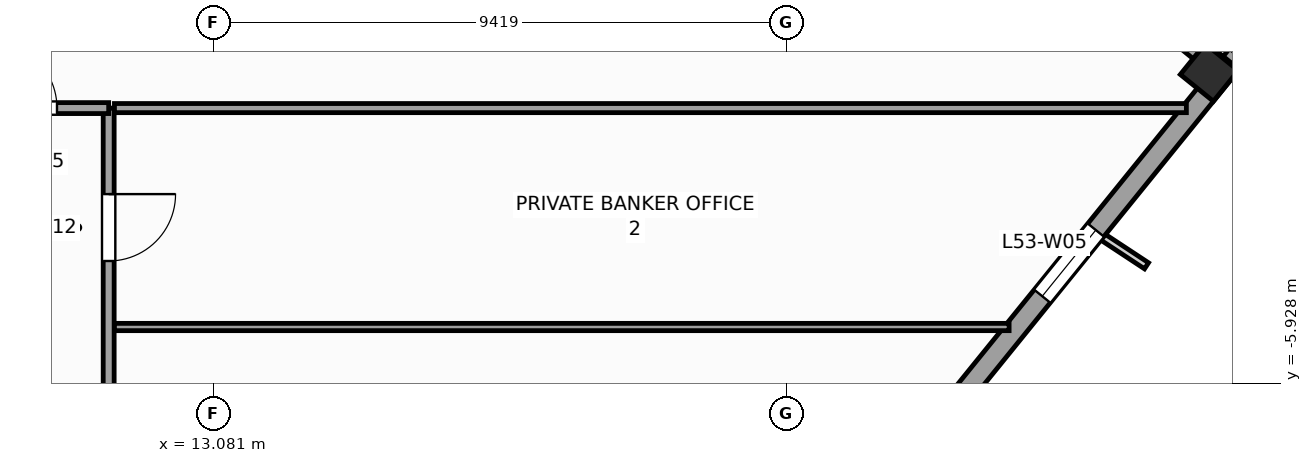
"""IFC4 building model, lengths in metres.
Left out: names, types, materials, properties, quantities, classifications, styles, units other than length and angle.
Written with IfcOpenShell. Run it as: python <this file> out.ifc"""

import sys

from ifc_helpers import new_model, si_unit, direction, frame, frame_2d, origin, origin_2d, place, context, subcontext, project, spatial, rectangle, extrude, source, transform, mapped, element, fill, save


model = new_model("IFC4")
c1 = context("Model", 3, precision=1e-05, world=origin(), true_north=direction((0.0, 1.0)))
c2 = subcontext(c1, "Body", "Model", "MODEL_VIEW")
j1 = project(units=[si_unit("LENGTHUNIT", "METRE"), si_unit("PLANEANGLEUNIT", "RADIAN")], contexts=[c1])
p1 = place(None, origin())
s1 = spatial("IfcSite", under=j1, at=p1, CompositionType="ELEMENT")
p2 = place(p1, origin())
s2 = spatial("IfcBuilding", under=s1, at=p2, CompositionType="ELEMENT")
p3 = place(p2, frame((0.0, 0.0, 221.2)))
s3 = spatial("IfcBuildingStorey", under=s2, at=p3, CompositionType="ELEMENT", Elevation=221.2)
m1 = source(origin(), c2, "Body", "SweptSolid", [
    extrude(rectangle(XDim=0.65, YDim=0.7, at=origin_2d()), origin(), (0.0, 0.0, 1.0), 3.9),
])
p4 = place(p3, frame((29.45, -0.815, 0.0), z_axis=(0.0, 0.0, 1.0), x_axis=(0.62932039105, 0.777145961457, 0.0)))
e1 = element("IfcColumn", 1, at=p4, inside=s3, PredefinedType="COLUMN", context=c2, shape_type="MappedRepresentation", body=[
    mapped(m1, transform((0.0, 0.0, 0.0), scale=1.0)),
])
p5 = place(p3, frame((6.733, -29.154, 0.0), z_axis=(0.0, 0.0, 1.0), x_axis=(0.629325378072, 0.77714192302, 0.0)))
e2 = element("IfcWall", 2, at=p5, inside=s3, PredefinedType="STANDARD", context=c2, shape_type="SweptSolid", body=[
    extrude(rectangle(XDim=36.84, YDim=0.34, at=frame_2d((18.42, 0.0))), origin(), (0.0, 0.0, 1.0), 2.96),
])
p6 = place(p5, frame((23.495, 0.0, 0.0)))
e3 = element("IfcOpeningElement", 3, at=p6, cuts=e2, PredefinedType="OPENING", context=c2, shape_type="SweptSolid", body=[
    extrude(rectangle(XDim=1.05, YDim=2.25, at=frame_2d((0.525, 1.125))), frame((0.0, 0.18, 0.0), z_axis=(0.0, -1.0, 0.0), x_axis=(1.0, 0.0, 0.0)), (0.0, 0.0, 1.0), 0.36),
])
p7 = place(p5, frame((3.721, 0.0, 0.48)))
e4 = element("IfcOpeningElement", 4, at=p7, cuts=e2, PredefinedType="OPENING", context=c2, shape_type="SweptSolid", body=[
    extrude(rectangle(XDim=1.4, YDim=2.4, at=frame_2d((0.7, 1.2))), frame((0.0, 0.18, 0.0), z_axis=(0.0, -1.0, 0.0), x_axis=(1.0, 0.0, 0.0)), (0.0, 0.0, 1.0), 0.36),
])
p8 = place(p5, frame((10.559, 0.0, 0.58)))
e5 = element("IfcOpeningElement", 5, at=p8, cuts=e2, PredefinedType="OPENING", context=c2, shape_type="SweptSolid", body=[
    extrude(rectangle(XDim=1.75, YDim=2.3, at=frame_2d((0.875, 1.15))), frame((0.0, 0.18, 0.0), z_axis=(0.0, -1.0, 0.0), x_axis=(1.0, 0.0, 0.0)), (0.0, 0.0, 1.0), 0.36),
])
p9 = place(p5, frame((16.058, 0.0, 0.58)))
e6 = element("IfcOpeningElement", 6, at=p9, cuts=e2, PredefinedType="OPENING", context=c2, shape_type="SweptSolid", body=[
    extrude(rectangle(XDim=1.75, YDim=2.3, at=frame_2d((0.875, 1.15))), frame((0.0, 0.18, 0.0), z_axis=(0.0, -1.0, 0.0), x_axis=(1.0, 0.0, 0.0)), (0.0, 0.0, 1.0), 0.36),
])
p10 = place(p5, frame((25.676, 0.0, 0.58)))
e7 = element("IfcOpeningElement", 7, at=p10, cuts=e2, PredefinedType="OPENING", context=c2, shape_type="SweptSolid", body=[
    extrude(rectangle(XDim=1.75, YDim=2.3, at=frame_2d((0.875, 1.15))), frame((0.0, 0.18, 0.0), z_axis=(0.0, -1.0, 0.0), x_axis=(1.0, 0.0, 0.0)), (0.0, 0.0, 1.0), 0.36),
])
p11 = place(p5, frame((31.732, 0.0, 0.48)))
e8 = element("IfcOpeningElement", 8, at=p11, cuts=e2, PredefinedType="OPENING", context=c2, shape_type="SweptSolid", body=[
    extrude(rectangle(XDim=1.4, YDim=2.4, at=frame_2d((0.7, 1.2))), frame((0.0, 0.18, 0.0), z_axis=(0.0, -1.0, 0.0), x_axis=(1.0, 0.0, 0.0)), (0.0, 0.0, 1.0), 0.36),
])
p12 = place(p3, frame((29.703, -0.789, 0.0), z_axis=(0.0, 0.0, 1.0), x_axis=(-0.77714355312, 0.629323365087, 0.0)))
e9 = element("IfcWall", 9, at=p12, inside=s3, PredefinedType="STANDARD", context=c2, shape_type="SweptSolid", body=[
    extrude(rectangle(XDim=5.5, YDim=0.34, at=frame_2d((2.75, 0.0))), origin(), (0.0, 0.0, 1.0), 3.66),
])
p13 = place(p3, frame((11.35, -10.2, 0.0), z_axis=(0.0, 0.0, 1.0), x_axis=(0.0, 1.0, 0.0)))
e10 = element("IfcWall", 10, at=p13, inside=s3, PredefinedType="PARTITIONING", context=c2, shape_type="SweptSolid", body=[
    extrude(rectangle(XDim=8.8, YDim=0.18, at=frame_2d((4.4, 0.0))), origin(), (0.0, 0.0, 1.0), 3.66),
])
p14 = place(p13, frame((3.05, 0.0, 0.0)))
e11 = element("IfcOpeningElement", 11, at=p14, cuts=e10, PredefinedType="OPENING", context=c2, shape_type="SweptSolid", body=[
    extrude(rectangle(XDim=1.1, YDim=2.2, at=frame_2d((0.55, 1.1))), frame((0.0, 0.1, 0.0), z_axis=(0.0, -1.0, 0.0), x_axis=(1.0, 0.0, 0.0)), (0.0, 0.0, 1.0), 0.2),
])
p15 = place(p13, frame((6.286, 0.0, 0.0)))
e12 = element("IfcOpeningElement", 12, at=p15, cuts=e10, PredefinedType="OPENING", context=c2, shape_type="SweptSolid", body=[
    extrude(rectangle(XDim=1.1, YDim=2.2, at=frame_2d((0.55, 1.1))), frame((0.0, 0.1, 0.0), z_axis=(0.0, -1.0, 0.0), x_axis=(1.0, 0.0, 0.0)), (0.0, 0.0, 1.0), 0.2),
])
p16 = place(p3, frame((8.55, -1.4, 0.0), z_axis=(0.0, 0.0, 1.0), x_axis=(1.0, 0.0, 0.0)))
e13 = element("IfcWall", 13, at=p16, inside=s3, PredefinedType="PARTITIONING", context=c2, shape_type="SweptSolid", body=[
    extrude(rectangle(XDim=2.8, YDim=0.18, at=frame_2d((1.4, 0.0))), origin(), (0.0, 0.0, 1.0), 3.66),
])
p17 = place(p16, frame((0.85, 0.0, 0.0)))
e14 = element("IfcOpeningElement", 14, at=p17, cuts=e13, PredefinedType="OPENING", context=c2, shape_type="SweptSolid", body=[
    extrude(rectangle(XDim=1.1, YDim=2.2, at=frame_2d((0.55, 1.1))), frame((0.0, 0.1, 0.0), z_axis=(0.0, -1.0, 0.0), x_axis=(1.0, 0.0, 0.0)), (0.0, 0.0, 1.0), 0.2),
])
p18 = place(p3, frame((11.445, -1.4, 0.0), z_axis=(0.0, 0.0, 1.0), x_axis=(1.0, 0.0, 0.0)))
e15 = element("IfcWall", 15, at=p18, inside=s3, PredefinedType="PARTITIONING", context=c2, shape_type="SweptSolid", body=[
    extrude(rectangle(XDim=17.628, YDim=0.15, at=frame_2d((8.814, 0.0))), origin(), (0.0, 0.0, 1.0), 3.66),
])
p19 = place(p3, frame((11.445, -5.0, 0.0), z_axis=(0.0, 0.0, 1.0), x_axis=(1.0, 0.0, 0.0)))
e16 = element("IfcWall", 16, at=p19, inside=s3, PredefinedType="PARTITIONING", context=c2, shape_type="SweptSolid", body=[
    extrude(rectangle(XDim=14.713, YDim=0.12, at=frame_2d((7.356, 0.0))), origin(), (0.0, 0.0, 1.0), 3.66),
])
m2 = source(origin(), c2, "Body", "SweptSolid", [
    extrude(rectangle(XDim=1.4, YDim=2.4, at=frame_2d((0.7, 1.2))), frame((0.0, 0.03, 0.0), z_axis=(0.0, -1.0, 0.0), x_axis=(1.0, 0.0, 0.0)), (0.0, 0.0, 1.0), 0.06),
])
p20 = place(p11, origin())
e17 = element("IfcWindow", 17, at=p20, inside=s3, PartitioningType="SINGLE_PANEL", PredefinedType="WINDOW", context=c2, shape_type="MappedRepresentation", body=[
    mapped(m2, transform((0.0, 0.0, 0.0), scale=1.0)),
])
fill(e8, e17)
m3 = source(origin(), c2, "Body", "SweptSolid", [
    extrude(rectangle(XDim=1.1, YDim=2.2, at=frame_2d((0.55, 1.1))), frame((0.0, 0.025, 0.0), z_axis=(0.0, -1.0, 0.0), x_axis=(1.0, 0.0, 0.0)), (0.0, 0.0, 1.0), 0.05),
])
p21 = place(p17, origin())
e18 = element("IfcDoor", 18, at=p21, inside=s3, OperationType="SINGLE_SWING_LEFT", PredefinedType="DOOR", context=c2, shape_type="MappedRepresentation", body=[
    mapped(m3, transform((0.0, 0.0, 0.0), scale=1.0)),
])
fill(e14, e18)
p22 = place(p15, frame((1.1, 0.0, 0.0), z_axis=(0.0, 0.0, 1.0), x_axis=(-1.0, 0.0, 0.0)))
e19 = element("IfcDoor", 19, at=p22, inside=s3, OperationType="SINGLE_SWING_RIGHT", PredefinedType="DOOR", context=c2, shape_type="MappedRepresentation", body=[
    mapped(m3, transform((0.0, 0.0, 0.0), scale=1.0)),
])
fill(e12, e19)
save(model, sys.argv[1])
